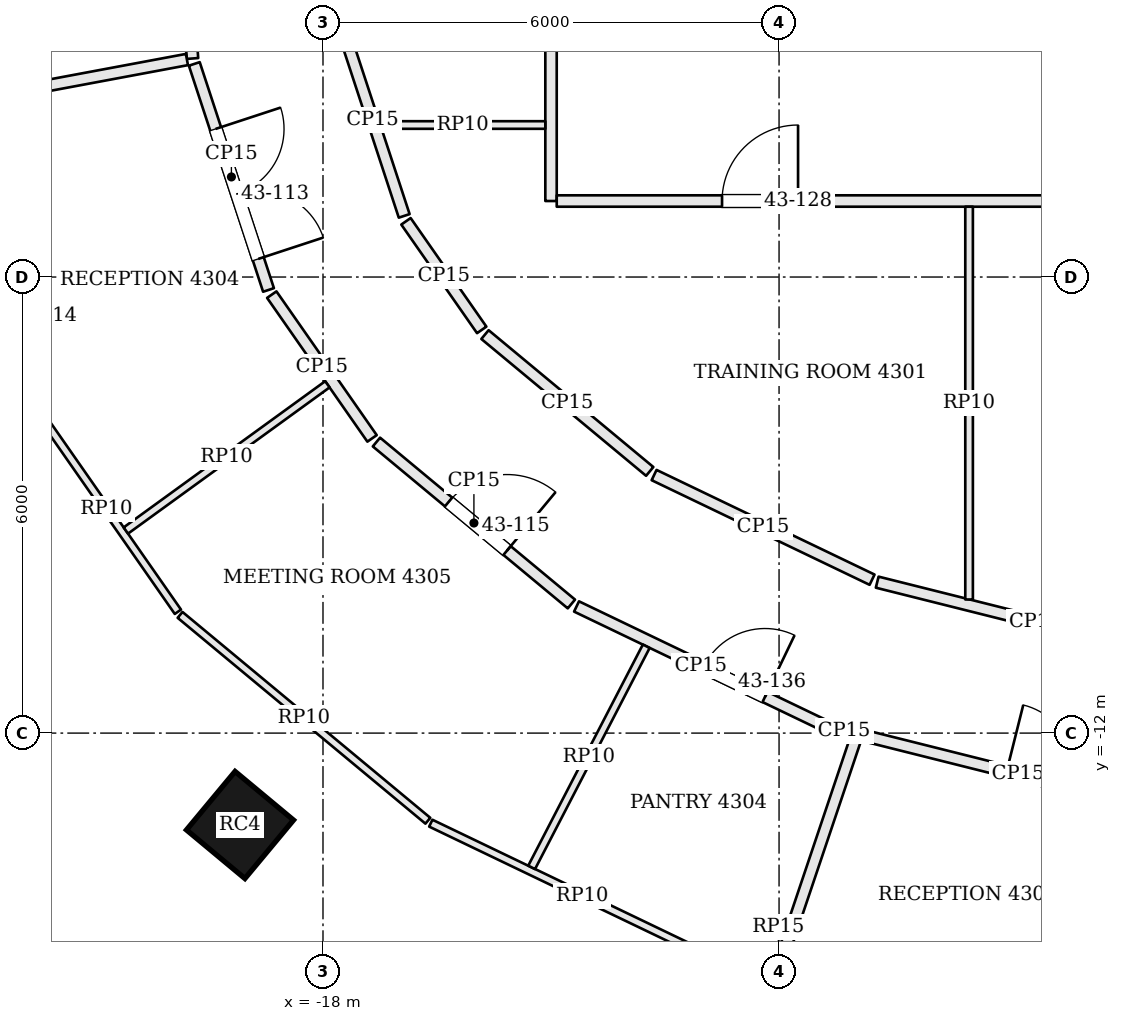
"""IFC4 building model, lengths in metres.
Left out: names, types, materials, properties, quantities, classifications, styles, units other than length and angle.
Written with IfcOpenShell. Run it as: python <this file> out.ifc"""

import sys

from ifc_helpers import new_model, si_unit, direction, frame, frame_2d, origin, origin_2d, place, context, subcontext, project, spatial, rectangle, extrude, element, fill, save


model = new_model("IFC4")
c1 = context("Model", 3, precision=1e-05, world=origin(), true_north=direction((0.0, 1.0)))
c2 = subcontext(c1, "Body", "Model", "MODEL_VIEW")
j1 = project(units=[si_unit("LENGTHUNIT", "METRE"), si_unit("PLANEANGLEUNIT", "RADIAN")], contexts=[c1])
p1 = place(None, origin())
s1 = spatial("IfcSite", under=j1, at=p1, CompositionType="ELEMENT")
p2 = place(p1, origin())
s2 = spatial("IfcBuilding", under=s1, at=p2, CompositionType="ELEMENT")
p3 = place(p2, frame((0.0, 0.0, 177.9)))
s3 = spatial("IfcBuildingStorey", under=s2, at=p3, CompositionType="ELEMENT", Elevation=177.9)
p4 = place(p3, frame((-19.092, -13.209, 0.0), z_axis=(0.0, 0.0, 1.0), x_axis=(0.76886986222, -0.63940529789, 0.0)))
e1 = element("IfcColumn", 1, at=p4, inside=s3, PredefinedType="COLUMN", context=c2, shape_type="SweptSolid", body=[
    extrude(rectangle(XDim=1.0, YDim=1.0, at=origin_2d()), origin(), (0.0, 0.0, 1.0), 3.9),
])
p5 = place(p3, frame((-19.943, -0.075, 0.0), z_axis=(0.0, 0.0, 1.0), x_axis=(0.074071611523, -0.997252924973, 0.0)))
e2 = element("IfcWall", 2, at=p5, inside=s3, PredefinedType="PARTITIONING", context=c2, shape_type="SweptSolid", body=[
    extrude(rectangle(XDim=3.059, YDim=0.15, at=frame_2d((1.529, 0.0))), origin(), (0.0, 0.0, 1.0), 3.084),
])
p6 = place(p5, frame((1.05, 0.0, 0.0)))
e3 = element("IfcOpeningElement", 3, at=p6, cuts=e2, PredefinedType="OPENING", context=c2, shape_type="SweptSolid", body=[
    extrude(rectangle(XDim=1.0, YDim=2.1, at=frame_2d((0.5, 1.05))), frame((0.0, 0.085, 0.0), z_axis=(0.0, -1.0, 0.0), x_axis=(1.0, 0.0, 0.0)), (0.0, 0.0, 1.0), 0.17),
])
p7 = place(p3, frame((-25.467, -4.199, 0.0), z_axis=(0.0, 0.0, 1.0), x_axis=(0.982998787258, 0.183612048216, 0.0)))
e4 = element("IfcWall", 4, at=p7, inside=s3, PredefinedType="PARTITIONING", context=c2, shape_type="SweptSolid", body=[
    extrude(rectangle(XDim=5.775, YDim=0.15, at=frame_2d((2.887, 0.0))), origin(), (0.0, 0.0, 1.0), 3.234),
])
p8 = place(p3, frame((-19.693, -3.196, 0.0), z_axis=(0.0, 0.0, 1.0), x_axis=(0.311918951318, -0.950108713679, 0.0)))
e5 = element("IfcWall", 5, at=p8, inside=s3, PredefinedType="PARTITIONING", context=c2, shape_type="SweptSolid", body=[
    extrude(rectangle(XDim=3.13, YDim=0.15, at=frame_2d((1.565, 0.0))), origin(), (0.0, 0.0, 1.0), 3.084),
])
p9 = place(p8, frame((0.9, 0.0, 0.0)))
e6 = element("IfcOpeningElement", 6, at=p9, cuts=e5, PredefinedType="OPENING", context=c2, shape_type="SweptSolid", body=[
    extrude(rectangle(XDim=1.8, YDim=2.1, at=frame_2d((0.9, 1.05))), frame((0.0, 0.085, 0.0), z_axis=(0.0, -1.0, 0.0), x_axis=(1.0, 0.0, 0.0)), (0.0, 0.0, 1.0), 0.17),
])
p10 = place(p3, frame((-18.674, -6.232, 0.0), z_axis=(0.0, 0.0, 1.0), x_axis=(0.572118665737, -0.820170855563, 0.0)))
e7 = element("IfcWall", 7, at=p10, inside=s3, PredefinedType="PARTITIONING", context=c2, shape_type="SweptSolid", body=[
    extrude(rectangle(XDim=2.306, YDim=0.15, at=frame_2d((1.153, 0.0))), origin(), (0.0, 0.0, 1.0), 3.084),
])
p11 = place(p3, frame((-17.297, -8.171, 0.0), z_axis=(0.0, 0.0, 1.0), x_axis=(0.769228575061, -0.638973707839, 0.0)))
e8 = element("IfcWall", 8, at=p11, inside=s3, PredefinedType="PARTITIONING", context=c2, shape_type="SweptSolid", body=[
    extrude(rectangle(XDim=3.334, YDim=0.15, at=frame_2d((1.667, 0.0))), origin(), (0.0, 0.0, 1.0), 3.084),
])
p12 = place(p11, frame((1.234, 0.0, 0.0)))
e9 = element("IfcOpeningElement", 9, at=p12, cuts=e8, PredefinedType="OPENING", context=c2, shape_type="SweptSolid", body=[
    extrude(rectangle(XDim=1.0, YDim=2.4, at=frame_2d((0.5, 1.2))), frame((0.0, 0.085, 0.0), z_axis=(0.0, -1.0, 0.0), x_axis=(1.0, 0.0, 0.0)), (0.0, 0.0, 1.0), 0.17),
])
p13 = place(p3, frame((-14.664, -10.334, 0.0), z_axis=(0.0, 0.0, 1.0), x_axis=(0.901507315282, -0.432763862278, 0.0)))
e10 = element("IfcWall", 10, at=p13, inside=s3, PredefinedType="PARTITIONING", context=c2, shape_type="SweptSolid", body=[
    extrude(rectangle(XDim=3.63, YDim=0.15, at=frame_2d((1.815, 0.0))), origin(), (0.0, 0.0, 1.0), 3.084),
])
p14 = place(p13, frame((1.85, 0.0, 0.0)))
e11 = element("IfcOpeningElement", 11, at=p14, cuts=e10, PredefinedType="OPENING", context=c2, shape_type="SweptSolid", body=[
    extrude(rectangle(XDim=0.9, YDim=2.1, at=frame_2d((0.45, 1.05))), frame((0.0, 0.085, 0.0), z_axis=(0.0, -1.0, 0.0), x_axis=(1.0, 0.0, 0.0)), (0.0, 0.0, 1.0), 0.17),
])
p15 = place(p3, frame((-11.319, -11.923, 0.0), z_axis=(0.0, 0.0, 1.0), x_axis=(0.969942256681, -0.243335198242, 0.0)))
e12 = element("IfcWall", 12, at=p15, inside=s3, PredefinedType="PARTITIONING", context=c2, shape_type="SweptSolid", body=[
    extrude(rectangle(XDim=0.359, YDim=0.15, at=frame_2d((0.18, 0.0))), origin(), (0.0, 0.0, 1.0), 3.084),
])
p16 = place(p3, frame((-13.024, -18.112, 0.0), z_axis=(0.0, 0.0, 1.0), x_axis=(0.319081027508, 0.947727438605, 0.0)))
e13 = element("IfcWall", 13, at=p16, inside=s3, PredefinedType="PARTITIONING", context=c2, shape_type="SweptSolid", body=[
    extrude(rectangle(XDim=6.363, YDim=0.15, at=frame_2d((3.181, 0.0))), origin(), (0.0, 0.0, 1.0), 3.234),
])
p17 = place(p3, frame((-10.897, -12.029, 0.0), z_axis=(0.0, 0.0, 1.0), x_axis=(0.969999087169, -0.24310855783, 0.0)))
e14 = element("IfcWall", 14, at=p17, inside=s3, PredefinedType="PARTITIONING", context=c2, shape_type="SweptSolid", body=[
    extrude(rectangle(XDim=4.211, YDim=0.15, at=frame_2d((2.105, 0.0))), origin(), (0.0, 0.0, 1.0), 3.084),
])
p18 = place(p17, frame((1.95, 0.0, 0.0)))
e15 = element("IfcOpeningElement", 15, at=p18, cuts=e14, PredefinedType="OPENING", context=c2, shape_type="SweptSolid", body=[
    extrude(rectangle(XDim=1.8, YDim=2.1, at=frame_2d((0.9, 1.05))), frame((0.0, 0.085, 0.0), z_axis=(0.0, -1.0, 0.0), x_axis=(1.0, 0.0, 0.0)), (0.0, 0.0, 1.0), 0.17),
])
p19 = place(p3, frame((-6.553, -11.056, 0.0), z_axis=(0.0, 0.0, 1.0), x_axis=(-0.970004917182, 0.243085294995, 0.0)))
e16 = element("IfcWall", 16, at=p19, inside=s3, PredefinedType="PARTITIONING", context=c2, shape_type="SweptSolid", body=[
    extrude(rectangle(XDim=4.284, YDim=0.15, at=frame_2d((2.142, 0.0))), origin(), (0.0, 0.0, 1.0), 3.084),
])
p20 = place(p3, frame((-10.776, -9.982, 0.0), z_axis=(0.0, 0.0, 1.0), x_axis=(-0.901511079436, 0.432756020933, 0.0)))
e17 = element("IfcWall", 17, at=p20, inside=s3, PredefinedType="PARTITIONING", context=c2, shape_type="SweptSolid", body=[
    extrude(rectangle(XDim=3.181, YDim=0.15, at=frame_2d((1.59, 0.0))), origin(), (0.0, 0.0, 1.0), 3.084),
])
p21 = place(p3, frame((-13.702, -8.557, 0.0), z_axis=(0.0, 0.0, 1.0), x_axis=(-0.769221825067, 0.638981833733, 0.0)))
e18 = element("IfcWall", 18, at=p21, inside=s3, PredefinedType="PARTITIONING", context=c2, shape_type="SweptSolid", body=[
    extrude(rectangle(XDim=2.817, YDim=0.15, at=frame_2d((1.409, 0.0))), origin(), (0.0, 0.0, 1.0), 3.084),
])
p22 = place(p3, frame((-15.912, -6.696, 0.0), z_axis=(0.0, 0.0, 1.0), x_axis=(-0.572078533763, 0.820198848578, 0.0)))
e19 = element("IfcWall", 19, at=p22, inside=s3, PredefinedType="PARTITIONING", context=c2, shape_type="SweptSolid", body=[
    extrude(rectangle(XDim=1.742, YDim=0.15, at=frame_2d((0.871, 0.0))), origin(), (0.0, 0.0, 1.0), 3.084),
])
p23 = place(p3, frame((-16.932, -5.196, 0.0), z_axis=(0.0, 0.0, 1.0), x_axis=(-0.311904957484, 0.950113307715, 0.0)))
e20 = element("IfcWall", 20, at=p23, inside=s3, PredefinedType="PARTITIONING", context=c2, shape_type="SweptSolid", body=[
    extrude(rectangle(XDim=2.662, YDim=0.15, at=frame_2d((1.331, 0.0))), origin(), (0.0, 0.0, 1.0), 3.084),
])
p24 = place(p3, frame((-15.0, 7.423, 0.0), z_axis=(0.0, 0.0, 1.0), x_axis=(0.0, -1.0, 0.0)))
e21 = element("IfcWall", 21, at=p24, inside=s3, PredefinedType="PARTITIONING", context=c2, shape_type="SweptSolid", body=[
    extrude(rectangle(XDim=12.423, YDim=0.15, at=frame_2d((6.211, 0.0))), origin(), (0.0, 0.0, 1.0), 3.084),
])
p25 = place(p24, frame((5.174, 0.0, 0.0)))
e22 = element("IfcOpeningElement", 22, at=p25, cuts=e21, PredefinedType="OPENING", context=c2, shape_type="SweptSolid", body=[
    extrude(rectangle(XDim=1.0, YDim=2.1, at=frame_2d((0.5, 1.05))), frame((0.0, 0.085, 0.0), z_axis=(0.0, -1.0, 0.0), x_axis=(1.0, 0.0, 0.0)), (0.0, 0.0, 1.0), 0.17),
])
p26 = place(p3, frame((-14.925, -5.0, 0.0), z_axis=(0.0, 0.0, 1.0), x_axis=(1.0, 0.0, 0.0)))
e23 = element("IfcWall", 23, at=p26, inside=s3, PredefinedType="PARTITIONING", context=c2, shape_type="SweptSolid", body=[
    extrude(rectangle(XDim=29.925, YDim=0.15, at=frame_2d((14.962, 0.0))), origin(), (0.0, 0.0, 1.0), 3.084),
])
p27 = place(p26, frame((2.175, 0.0, 0.0)))
e24 = element("IfcOpeningElement", 24, at=p27, cuts=e23, PredefinedType="OPENING", context=c2, shape_type="SweptSolid", body=[
    extrude(rectangle(XDim=1.0, YDim=2.1, at=frame_2d((0.5, 1.05))), frame((0.0, 0.085, 0.0), z_axis=(0.0, -1.0, 0.0), x_axis=(1.0, 0.0, 0.0)), (0.0, 0.0, 1.0), 0.17),
])
p28 = place(p26, frame((14.025, 0.0, 0.0)))
e25 = element("IfcOpeningElement", 25, at=p28, cuts=e23, PredefinedType="OPENING", context=c2, shape_type="SweptSolid", body=[
    extrude(rectangle(XDim=1.8, YDim=2.1, at=frame_2d((0.9, 1.05))), frame((0.0, 0.085, 0.0), z_axis=(0.0, -1.0, 0.0), x_axis=(1.0, 0.0, 0.0)), (0.0, 0.0, 1.0), 0.17),
])
p29 = place(p26, frame((26.675, 0.0, 0.0)))
e26 = element("IfcOpeningElement", 26, at=p29, cuts=e23, PredefinedType="OPENING", context=c2, shape_type="SweptSolid", body=[
    extrude(rectangle(XDim=1.0, YDim=2.1, at=frame_2d((0.5, 1.05))), frame((0.0, 0.085, 0.0), z_axis=(0.0, -1.0, 0.0), x_axis=(1.0, 0.0, 0.0)), (0.0, 0.0, 1.0), 0.17),
])
p30 = place(p3, frame((-12.597, -15.098, 0.0), z_axis=(0.0, 0.0, 1.0), x_axis=(-0.901514437286, 0.432749025839, 0.0)))
e27 = element("IfcWall", 27, at=p30, inside=s3, PredefinedType="PARTITIONING", context=c2, shape_type="SweptSolid", body=[
    extrude(rectangle(XDim=4.42, YDim=0.1, at=frame_2d((2.21, 0.0))), origin(), (0.0, 0.0, 1.0), 3.084),
])
p31 = place(p3, frame((-16.62, -13.153, 0.0), z_axis=(0.0, 0.0, 1.0), x_axis=(-0.76922129881, 0.638982467253, 0.0)))
e28 = element("IfcWall", 28, at=p31, inside=s3, PredefinedType="PARTITIONING", context=c2, shape_type="SweptSolid", body=[
    extrude(rectangle(XDim=4.238, YDim=0.1, at=frame_2d((2.119, 0.0))), origin(), (0.0, 0.0, 1.0), 3.084),
])
p32 = place(p3, frame((-19.909, -10.404, 0.0), z_axis=(0.0, 0.0, 1.0), x_axis=(-0.572111951901, 0.820175538828, 0.0)))
e29 = element("IfcWall", 29, at=p32, inside=s3, PredefinedType="PARTITIONING", context=c2, shape_type="SweptSolid", body=[
    extrude(rectangle(XDim=3.29, YDim=0.1, at=frame_2d((1.645, 0.0))), origin(), (0.0, 0.0, 1.0), 3.084),
])
p33 = place(p3, frame((-17.942, -7.412, 0.0), z_axis=(0.0, 0.0, 1.0), x_axis=(-0.809425321456, -0.587222827372, 0.0)))
e30 = element("IfcWall", 30, at=p33, inside=s3, PredefinedType="PARTITIONING", context=c2, shape_type="SweptSolid", body=[
    extrude(rectangle(XDim=3.275, YDim=0.1, at=frame_2d((1.638, 0.0))), origin(), (0.0, 0.0, 1.0), 3.084),
])
p34 = place(p3, frame((-13.747, -10.857, 0.0), z_axis=(0.0, 0.0, 1.0), x_axis=(-0.460160569956, -0.887835711074, 0.0)))
e31 = element("IfcWall", 31, at=p34, inside=s3, PredefinedType="PARTITIONING", context=c2, shape_type="SweptSolid", body=[
    extrude(rectangle(XDim=3.277, YDim=0.1, at=frame_2d((1.638, 0.0))), origin(), (0.0, 0.0, 1.0), 3.084),
])
p35 = place(p3, frame((-9.5, -10.242, 0.0), z_axis=(0.0, 0.0, 1.0), x_axis=(0.0, 1.0, 0.0)))
e32 = element("IfcWall", 32, at=p35, inside=s3, PredefinedType="PARTITIONING", context=c2, shape_type="SweptSolid", body=[
    extrude(rectangle(XDim=5.167, YDim=0.1, at=frame_2d((2.583, 0.0))), origin(), (0.0, 0.0, 1.0), 3.084),
])
p36 = place(p3, frame((-17.249, -4.0, 0.0), z_axis=(0.0, 0.0, 1.0), x_axis=(1.0, 0.0, 0.0)))
e33 = element("IfcWall", 33, at=p36, inside=s3, PredefinedType="PARTITIONING", context=c2, shape_type="SweptSolid", body=[
    extrude(rectangle(XDim=2.174, YDim=0.1, at=frame_2d((1.087, 0.0))), origin(), (0.0, 0.0, 1.0), 3.084),
])
p37 = place(p9, origin())
e34 = element("IfcDoor", 34, at=p37, inside=s3, OperationType="DOUBLE_DOOR_SINGLE_SWING", PredefinedType="DOOR", context=c2, shape_type="SweptSolid", body=[
    extrude(rectangle(XDim=1.8, YDim=2.1, at=frame_2d((0.9, 1.05))), frame((0.0, 0.025, 0.0), z_axis=(0.0, -1.0, 0.0), x_axis=(1.0, 0.0, 0.0)), (0.0, 0.0, 1.0), 0.05),
])
fill(e6, e34)
p38 = place(p12, origin())
e35 = element("IfcDoor", 35, at=p38, inside=s3, OperationType="SINGLE_SWING_RIGHT", PredefinedType="DOOR", context=c2, shape_type="SweptSolid", body=[
    extrude(rectangle(XDim=1.0, YDim=2.4, at=frame_2d((0.5, 1.2))), frame((0.0, 0.025, 0.0), z_axis=(0.0, -1.0, 0.0), x_axis=(1.0, 0.0, 0.0)), (0.0, 0.0, 1.0), 0.05),
])
fill(e9, e35)
p39 = place(p18, origin())
e36 = element("IfcDoor", 36, at=p39, inside=s3, OperationType="DOUBLE_DOOR_SINGLE_SWING", PredefinedType="DOOR", context=c2, shape_type="SweptSolid", body=[
    extrude(rectangle(XDim=1.8, YDim=2.1, at=frame_2d((0.9, 1.05))), frame((0.0, 0.025, 0.0), z_axis=(0.0, -1.0, 0.0), x_axis=(1.0, 0.0, 0.0)), (0.0, 0.0, 1.0), 0.05),
])
fill(e15, e36)
p40 = place(p27, origin())
e37 = element("IfcDoor", 37, at=p40, inside=s3, OperationType="SINGLE_SWING_RIGHT", PredefinedType="DOOR", context=c2, shape_type="SweptSolid", body=[
    extrude(rectangle(XDim=1.0, YDim=2.1, at=frame_2d((0.5, 1.05))), frame((0.0, 0.025, 0.0), z_axis=(0.0, -1.0, 0.0), x_axis=(1.0, 0.0, 0.0)), (0.0, 0.0, 1.0), 0.05),
])
fill(e24, e37)
p41 = place(p14, origin())
e38 = element("IfcDoor", 38, at=p41, inside=s3, OperationType="SINGLE_SWING_RIGHT", PredefinedType="DOOR", context=c2, shape_type="SweptSolid", body=[
    extrude(rectangle(XDim=0.9, YDim=2.1, at=frame_2d((0.45, 1.05))), frame((0.0, 0.025, 0.0), z_axis=(0.0, -1.0, 0.0), x_axis=(1.0, 0.0, 0.0)), (0.0, 0.0, 1.0), 0.05),
])
fill(e11, e38)
save(model, sys.argv[1])
